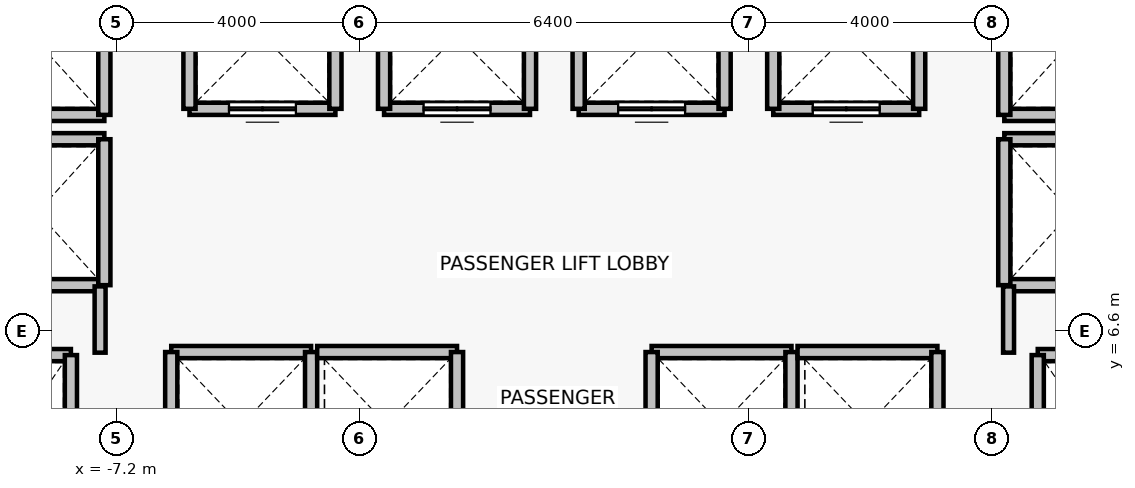
"""IFC4 building model, lengths in metres.
Left out: names, types, materials, properties, quantities, classifications, styles, units other than length and angle.
Written with IfcOpenShell. Run it as: python <this file> out.ifc"""

import sys

from ifc_helpers import new_model, si_unit, direction, frame, frame_2d, origin, place, context, subcontext, project, spatial, rectangle, extrude, source, transform, mapped, element, fill, save


model = new_model("IFC4")
c1 = context("Model", 3, precision=1e-05, world=origin(), true_north=direction((0.0, 1.0)))
c2 = subcontext(c1, "Body", "Model", "MODEL_VIEW")
j1 = project(units=[si_unit("LENGTHUNIT", "METRE"), si_unit("PLANEANGLEUNIT", "RADIAN")], contexts=[c1])
p1 = place(None, origin())
s1 = spatial("IfcSite", under=j1, at=p1, CompositionType="ELEMENT")
p2 = place(p1, origin())
s2 = spatial("IfcBuilding", under=s1, at=p2, CompositionType="ELEMENT")
p3 = place(p2, frame((0.0, 0.0, 63.7)))
s3 = spatial("IfcBuildingStorey", under=s2, at=p3, CompositionType="ELEMENT", Elevation=63.7)
p4 = place(p3, frame((-9.95, 6.2, 0.0), z_axis=(0.0, 0.0, 1.0), x_axis=(1.0, 0.0, 0.0)))
e1 = element("IfcWall", 1, at=p4, inside=s3, PredefinedType="SOLIDWALL", context=c2, shape_type="SweptSolid", body=[
    extrude(rectangle(XDim=2.0, YDim=0.2, at=frame_2d((1.0, 0.0))), origin(), (0.0, 0.0, 1.0), 3.075),
])
p5 = place(p3, frame((-7.95, 6.2, 0.0), z_axis=(0.0, 0.0, 1.0), x_axis=(0.0, -1.0, 0.0)))
e2 = element("IfcWall", 2, at=p5, inside=s3, PredefinedType="SOLIDWALL", context=c2, shape_type="SweptSolid", body=[
    extrude(rectangle(XDim=2.8, YDim=0.2, at=frame_2d((1.4, 0.0))), origin(), (0.0, 0.0, 1.0), 3.075),
])
p6 = place(p3, frame((7.95, 6.2, 0.0), z_axis=(0.0, 0.0, 1.0), x_axis=(1.0, 0.0, 0.0)))
e3 = element("IfcWall", 3, at=p6, inside=s3, PredefinedType="SOLIDWALL", context=c2, shape_type="SweptSolid", body=[
    extrude(rectangle(XDim=2.0, YDim=0.2, at=frame_2d((1.0, 0.0))), origin(), (0.0, 0.0, 1.0), 3.075),
])
p7 = place(p3, frame((7.95, 3.4, 0.0), z_axis=(0.0, 0.0, 1.0), x_axis=(0.0, 1.0, 0.0)))
e4 = element("IfcWall", 4, at=p7, inside=s3, PredefinedType="SOLIDWALL", context=c2, shape_type="SweptSolid", body=[
    extrude(rectangle(XDim=2.8, YDim=0.2, at=frame_2d((1.4, 0.0))), origin(), (0.0, 0.0, 1.0), 3.075),
])
p8 = place(p3, frame((-3.6, 10.25, 0.0), z_axis=(0.0, 0.0, 1.0), x_axis=(-1.0, 0.0, 0.0)))
e5 = element("IfcWall", 5, at=p8, inside=s3, PredefinedType="SOLIDWALL", context=c2, shape_type="SweptSolid", body=[
    extrude(rectangle(XDim=2.4, YDim=0.2, at=frame_2d((1.2, 0.0))), origin(), (0.0, 0.0, 1.0), 3.075),
])
p9 = place(p8, frame((0.65, 0.0, 0.0)))
e6 = element("IfcOpeningElement", 6, at=p9, cuts=e5, PredefinedType="OPENING", context=c2, shape_type="SweptSolid", body=[
    extrude(rectangle(XDim=1.1, YDim=2.2, at=frame_2d((0.55, 1.1))), frame((0.0, 0.11, 0.0), z_axis=(0.0, -1.0, 0.0), x_axis=(1.0, 0.0, 0.0)), (0.0, 0.0, 1.0), 0.22),
])
for number, where, z_axis, x_axis in (
    (7, (-6.0, 10.25, 0.0), (0.0, 0.0, 1.0), (0.0, 1.0, 0.0)),
    (8, (-3.6, 12.65, 0.0), (0.0, 0.0, 1.0), (0.0, -1.0, 0.0)),
):
    element("IfcWall", number, at=place(p3, frame(where, z_axis=z_axis, x_axis=x_axis)), inside=s3, PredefinedType="SOLIDWALL", context=c2, shape_type="SweptSolid", body=[
        extrude(rectangle(XDim=2.4, YDim=0.2, at=frame_2d((1.2, 0.0))), origin(), (0.0, 0.0, 1.0), 3.075),
    ])
p10 = place(p3, frame((-0.4, 10.25, 0.0), z_axis=(0.0, 0.0, 1.0), x_axis=(-1.0, 0.0, 0.0)))
e9 = element("IfcWall", 9, at=p10, inside=s3, PredefinedType="SOLIDWALL", context=c2, shape_type="SweptSolid", body=[
    extrude(rectangle(XDim=2.4, YDim=0.2, at=frame_2d((1.2, 0.0))), origin(), (0.0, 0.0, 1.0), 3.075),
])
p11 = place(p10, frame((0.65, 0.0, 0.0)))
e10 = element("IfcOpeningElement", 10, at=p11, cuts=e9, PredefinedType="OPENING", context=c2, shape_type="SweptSolid", body=[
    extrude(rectangle(XDim=1.1, YDim=2.2, at=frame_2d((0.55, 1.1))), frame((0.0, 0.11, 0.0), z_axis=(0.0, -1.0, 0.0), x_axis=(1.0, 0.0, 0.0)), (0.0, 0.0, 1.0), 0.22),
])
for number, where, z_axis, x_axis in (
    (11, (-2.8, 10.25, 0.0), (0.0, 0.0, 1.0), (0.0, 1.0, 0.0)),
    (12, (-0.4, 12.65, 0.0), (0.0, 0.0, 1.0), (0.0, -1.0, 0.0)),
):
    element("IfcWall", number, at=place(p3, frame(where, z_axis=z_axis, x_axis=x_axis)), inside=s3, PredefinedType="SOLIDWALL", context=c2, shape_type="SweptSolid", body=[
        extrude(rectangle(XDim=2.4, YDim=0.2, at=frame_2d((1.2, 0.0))), origin(), (0.0, 0.0, 1.0), 3.075),
    ])
p12 = place(p3, frame((2.8, 10.25, 0.0), z_axis=(0.0, 0.0, 1.0), x_axis=(-1.0, 0.0, 0.0)))
e13 = element("IfcWall", 13, at=p12, inside=s3, PredefinedType="SOLIDWALL", context=c2, shape_type="SweptSolid", body=[
    extrude(rectangle(XDim=2.4, YDim=0.2, at=frame_2d((1.2, 0.0))), origin(), (0.0, 0.0, 1.0), 3.075),
])
p13 = place(p12, frame((0.65, 0.0, 0.0)))
e14 = element("IfcOpeningElement", 14, at=p13, cuts=e13, PredefinedType="OPENING", context=c2, shape_type="SweptSolid", body=[
    extrude(rectangle(XDim=1.1, YDim=2.2, at=frame_2d((0.55, 1.1))), frame((0.0, 0.11, 0.0), z_axis=(0.0, -1.0, 0.0), x_axis=(1.0, 0.0, 0.0)), (0.0, 0.0, 1.0), 0.22),
])
for number, where, z_axis, x_axis in (
    (15, (0.4, 10.25, 0.0), (0.0, 0.0, 1.0), (0.0, 1.0, 0.0)),
    (16, (2.8, 12.65, 0.0), (0.0, 0.0, 1.0), (0.0, -1.0, 0.0)),
):
    element("IfcWall", number, at=place(p3, frame(where, z_axis=z_axis, x_axis=x_axis)), inside=s3, PredefinedType="SOLIDWALL", context=c2, shape_type="SweptSolid", body=[
        extrude(rectangle(XDim=2.4, YDim=0.2, at=frame_2d((1.2, 0.0))), origin(), (0.0, 0.0, 1.0), 3.075),
    ])
p14 = place(p3, frame((6.0, 10.25, 0.0), z_axis=(0.0, 0.0, 1.0), x_axis=(-1.0, 0.0, 0.0)))
e17 = element("IfcWall", 17, at=p14, inside=s3, PredefinedType="SOLIDWALL", context=c2, shape_type="SweptSolid", body=[
    extrude(rectangle(XDim=2.4, YDim=0.2, at=frame_2d((1.2, 0.0))), origin(), (0.0, 0.0, 1.0), 3.075),
])
p15 = place(p14, frame((0.65, 0.0, 0.0)))
e18 = element("IfcOpeningElement", 18, at=p15, cuts=e17, PredefinedType="OPENING", context=c2, shape_type="SweptSolid", body=[
    extrude(rectangle(XDim=1.1, YDim=2.2, at=frame_2d((0.55, 1.1))), frame((0.0, 0.11, 0.0), z_axis=(0.0, -1.0, 0.0), x_axis=(1.0, 0.0, 0.0)), (0.0, 0.0, 1.0), 0.22),
])
for number, where, z_axis, x_axis in (
    (19, (3.6, 10.25, 0.0), (0.0, 0.0, 1.0), (0.0, 1.0, 0.0)),
    (20, (6.0, 12.65, 0.0), (0.0, 0.0, 1.0), (0.0, -1.0, 0.0)),
):
    element("IfcWall", number, at=place(p3, frame(where, z_axis=z_axis, x_axis=x_axis)), inside=s3, PredefinedType="SOLIDWALL", context=c2, shape_type="SweptSolid", body=[
        extrude(rectangle(XDim=2.4, YDim=0.2, at=frame_2d((1.2, 0.0))), origin(), (0.0, 0.0, 1.0), 3.075),
    ])
p16 = place(p3, frame((-6.3, 6.25, 0.0), z_axis=(0.0, 0.0, 1.0), x_axis=(1.0, 0.0, 0.0)))
e21 = element("IfcWall", 21, at=p16, inside=s3, PredefinedType="SOLIDWALL", context=c2, shape_type="SweptSolid", body=[
    extrude(rectangle(XDim=2.3, YDim=0.2, at=frame_2d((1.15, 0.0))), origin(), (0.0, 0.0, 1.0), 3.075),
])
for number, where, z_axis, x_axis in (
    (22, (-6.3, 3.85, 0.0), (0.0, 0.0, 1.0), (0.0, 1.0, 0.0)),
    (23, (-4.0, 6.25, 0.0), (0.0, 0.0, 1.0), (0.0, -1.0, 0.0)),
):
    element("IfcWall", number, at=place(p3, frame(where, z_axis=z_axis, x_axis=x_axis)), inside=s3, PredefinedType="SOLIDWALL", context=c2, shape_type="SweptSolid", body=[
        extrude(rectangle(XDim=2.4, YDim=0.2, at=frame_2d((1.2, 0.0))), origin(), (0.0, 0.0, 1.0), 3.075),
    ])
p17 = place(p3, frame((-3.9, 6.25, 0.0), z_axis=(0.0, 0.0, 1.0), x_axis=(1.0, 0.0, 0.0)))
e24 = element("IfcWall", 24, at=p17, inside=s3, PredefinedType="SOLIDWALL", context=c2, shape_type="SweptSolid", body=[
    extrude(rectangle(XDim=2.3, YDim=0.2, at=frame_2d((1.15, 0.0))), origin(), (0.0, 0.0, 1.0), 3.075),
])
p18 = place(p3, frame((-1.6, 6.25, 0.0), z_axis=(0.0, 0.0, 1.0), x_axis=(0.0, -1.0, 0.0)))
e25 = element("IfcWall", 25, at=p18, inside=s3, PredefinedType="SOLIDWALL", context=c2, shape_type="SweptSolid", body=[
    extrude(rectangle(XDim=2.4, YDim=0.2, at=frame_2d((1.2, 0.0))), origin(), (0.0, 0.0, 1.0), 3.075),
])
p19 = place(p3, frame((1.6, 6.25, 0.0), z_axis=(0.0, 0.0, 1.0), x_axis=(1.0, 0.0, 0.0)))
e26 = element("IfcWall", 26, at=p19, inside=s3, PredefinedType="SOLIDWALL", context=c2, shape_type="SweptSolid", body=[
    extrude(rectangle(XDim=2.3, YDim=0.2, at=frame_2d((1.15, 0.0))), origin(), (0.0, 0.0, 1.0), 3.075),
])
for number, where, z_axis, x_axis in (
    (27, (1.6, 3.85, 0.0), (0.0, 0.0, 1.0), (0.0, 1.0, 0.0)),
    (28, (3.9, 6.25, 0.0), (0.0, 0.0, 1.0), (0.0, -1.0, 0.0)),
):
    element("IfcWall", number, at=place(p3, frame(where, z_axis=z_axis, x_axis=x_axis)), inside=s3, PredefinedType="SOLIDWALL", context=c2, shape_type="SweptSolid", body=[
        extrude(rectangle(XDim=2.4, YDim=0.2, at=frame_2d((1.2, 0.0))), origin(), (0.0, 0.0, 1.0), 3.075),
    ])
p20 = place(p3, frame((4.0, 6.25, 0.0), z_axis=(0.0, 0.0, 1.0), x_axis=(1.0, 0.0, 0.0)))
e29 = element("IfcWall", 29, at=p20, inside=s3, PredefinedType="SOLIDWALL", context=c2, shape_type="SweptSolid", body=[
    extrude(rectangle(XDim=2.3, YDim=0.2, at=frame_2d((1.15, 0.0))), origin(), (0.0, 0.0, 1.0), 3.075),
])
p21 = place(p3, frame((6.3, 6.25, 0.0), z_axis=(0.0, 0.0, 1.0), x_axis=(0.0, -1.0, 0.0)))
e30 = element("IfcWall", 30, at=p21, inside=s3, PredefinedType="SOLIDWALL", context=c2, shape_type="SweptSolid", body=[
    extrude(rectangle(XDim=2.4, YDim=0.2, at=frame_2d((1.2, 0.0))), origin(), (0.0, 0.0, 1.0), 3.075),
])
for number, where, z_axis, x_axis in (
    (31, (-7.4, 7.35, 0.0), (0.0, 0.0, 1.0), (-1.0, 0.0, 0.0)),
    (32, (-9.6, 9.75, 0.0), (0.0, 0.0, 1.0), (1.0, 0.0, 0.0)),
):
    element("IfcWall", number, at=place(p3, frame(where, z_axis=z_axis, x_axis=x_axis)), inside=s3, PredefinedType="SOLIDWALL", context=c2, shape_type="SweptSolid", body=[
        extrude(rectangle(XDim=2.2, YDim=0.2, at=frame_2d((1.1, 0.0))), origin(), (0.0, 0.0, 1.0), 2.465),
    ])
p22 = place(p3, frame((-7.4, 9.75, 0.0), z_axis=(0.0, 0.0, 1.0), x_axis=(0.0, -1.0, 0.0)))
e33 = element("IfcWall", 33, at=p22, inside=s3, PredefinedType="SOLIDWALL", context=c2, shape_type="SweptSolid", body=[
    extrude(rectangle(XDim=2.4, YDim=0.2, at=frame_2d((1.2, 0.0))), origin(), (0.0, 0.0, 1.0), 2.465),
])
p23 = place(p3, frame((-7.4, 10.15, 0.0), z_axis=(0.0, 0.0, 1.0), x_axis=(-1.0, 0.0, 0.0)))
e34 = element("IfcWall", 34, at=p23, inside=s3, PredefinedType="SOLIDWALL", context=c2, shape_type="SweptSolid", body=[
    extrude(rectangle(XDim=2.2, YDim=0.2, at=frame_2d((1.1, 0.0))), origin(), (0.0, 0.0, 1.0), 2.465),
])
p24 = place(p3, frame((-7.4, 12.55, 0.0), z_axis=(0.0, 0.0, 1.0), x_axis=(0.0, -1.0, 0.0)))
e35 = element("IfcWall", 35, at=p24, inside=s3, PredefinedType="SOLIDWALL", context=c2, shape_type="SweptSolid", body=[
    extrude(rectangle(XDim=2.4, YDim=0.2, at=frame_2d((1.2, 0.0))), origin(), (0.0, 0.0, 1.0), 2.465),
])
for number, where, z_axis, x_axis in (
    (36, (9.6, 7.35, 0.0), (0.0, 0.0, 1.0), (-1.0, 0.0, 0.0)),
    (37, (7.4, 9.75, 0.0), (0.0, 0.0, 1.0), (1.0, 0.0, 0.0)),
):
    element("IfcWall", number, at=place(p3, frame(where, z_axis=z_axis, x_axis=x_axis)), inside=s3, PredefinedType="SOLIDWALL", context=c2, shape_type="SweptSolid", body=[
        extrude(rectangle(XDim=2.2, YDim=0.2, at=frame_2d((1.1, 0.0))), origin(), (0.0, 0.0, 1.0), 2.465),
    ])
p25 = place(p3, frame((7.4, 7.35, 0.0), z_axis=(0.0, 0.0, 1.0), x_axis=(0.0, 1.0, 0.0)))
e38 = element("IfcWall", 38, at=p25, inside=s3, PredefinedType="SOLIDWALL", context=c2, shape_type="SweptSolid", body=[
    extrude(rectangle(XDim=2.4, YDim=0.2, at=frame_2d((1.2, 0.0))), origin(), (0.0, 0.0, 1.0), 2.465),
])
p26 = place(p3, frame((9.6, 10.15, 0.0), z_axis=(0.0, 0.0, 1.0), x_axis=(-1.0, 0.0, 0.0)))
e39 = element("IfcWall", 39, at=p26, inside=s3, PredefinedType="SOLIDWALL", context=c2, shape_type="SweptSolid", body=[
    extrude(rectangle(XDim=2.2, YDim=0.2, at=frame_2d((1.1, 0.0))), origin(), (0.0, 0.0, 1.0), 2.465),
])
p27 = place(p3, frame((7.4, 10.15, 0.0), z_axis=(0.0, 0.0, 1.0), x_axis=(0.0, 1.0, 0.0)))
e40 = element("IfcWall", 40, at=p27, inside=s3, PredefinedType="SOLIDWALL", context=c2, shape_type="SweptSolid", body=[
    extrude(rectangle(XDim=2.4, YDim=0.2, at=frame_2d((1.2, 0.0))), origin(), (0.0, 0.0, 1.0), 2.465),
])
for number, where, z_axis, x_axis in (
    (41, (-7.47, 7.33, 0.0), (0.0, 0.0, 1.0), (0.0, -1.0, 0.0)),
    (42, (7.47, 6.24, 0.0), (0.0, 0.0, 1.0), (0.0, 1.0, 0.0)),
):
    element("IfcWall", number, at=place(p3, frame(where, z_axis=z_axis, x_axis=x_axis)), inside=s3, PredefinedType="PARTITIONING", context=c2, shape_type="SweptSolid", body=[
        extrude(rectangle(XDim=1.09, YDim=0.18, at=frame_2d((0.545, 0.0))), origin(), (0.0, 0.0, 1.0), 2.465),
    ])
m1 = source(origin(), c2, "Body", "SweptSolid", [
    extrude(rectangle(XDim=1.1, YDim=2.2, at=frame_2d((0.55, 1.1))), frame((0.0, 0.025, 0.0), z_axis=(0.0, -1.0, 0.0), x_axis=(1.0, 0.0, 0.0)), (0.0, 0.0, 1.0), 0.05),
])
p28 = place(p9, origin())
e43 = element("IfcDoor", 43, at=p28, inside=s3, OperationType="DOUBLE_DOOR_SLIDING", PredefinedType="DOOR", context=c2, shape_type="MappedRepresentation", body=[
    mapped(m1, transform((0.0, 0.0, 0.0), x_axis=(1.0, 0.0, 0.0), y_axis=(0.0, 1.0, 0.0), z_axis=(0.0, 0.0, 1.0), scale=1.0)),
])
fill(e6, e43)
p29 = place(p11, origin())
e44 = element("IfcDoor", 44, at=p29, inside=s3, OperationType="DOUBLE_DOOR_SLIDING", PredefinedType="DOOR", context=c2, shape_type="MappedRepresentation", body=[
    mapped(m1, transform((0.0, 0.0, 0.0), x_axis=(1.0, 0.0, 0.0), y_axis=(0.0, 1.0, 0.0), z_axis=(0.0, 0.0, 1.0), scale=1.0)),
])
fill(e10, e44)
p30 = place(p13, origin())
e45 = element("IfcDoor", 45, at=p30, inside=s3, OperationType="DOUBLE_DOOR_SLIDING", PredefinedType="DOOR", context=c2, shape_type="MappedRepresentation", body=[
    mapped(m1, transform((0.0, 0.0, 0.0), x_axis=(1.0, 0.0, 0.0), y_axis=(0.0, 1.0, 0.0), z_axis=(0.0, 0.0, 1.0), scale=1.0)),
])
fill(e14, e45)
p31 = place(p15, origin())
e46 = element("IfcDoor", 46, at=p31, inside=s3, OperationType="DOUBLE_DOOR_SLIDING", PredefinedType="DOOR", context=c2, shape_type="MappedRepresentation", body=[
    mapped(m1, transform((0.0, 0.0, 0.0), x_axis=(1.0, 0.0, 0.0), y_axis=(0.0, 1.0, 0.0), z_axis=(0.0, 0.0, 1.0), scale=1.0)),
])
fill(e18, e46)
save(model, sys.argv[1])
